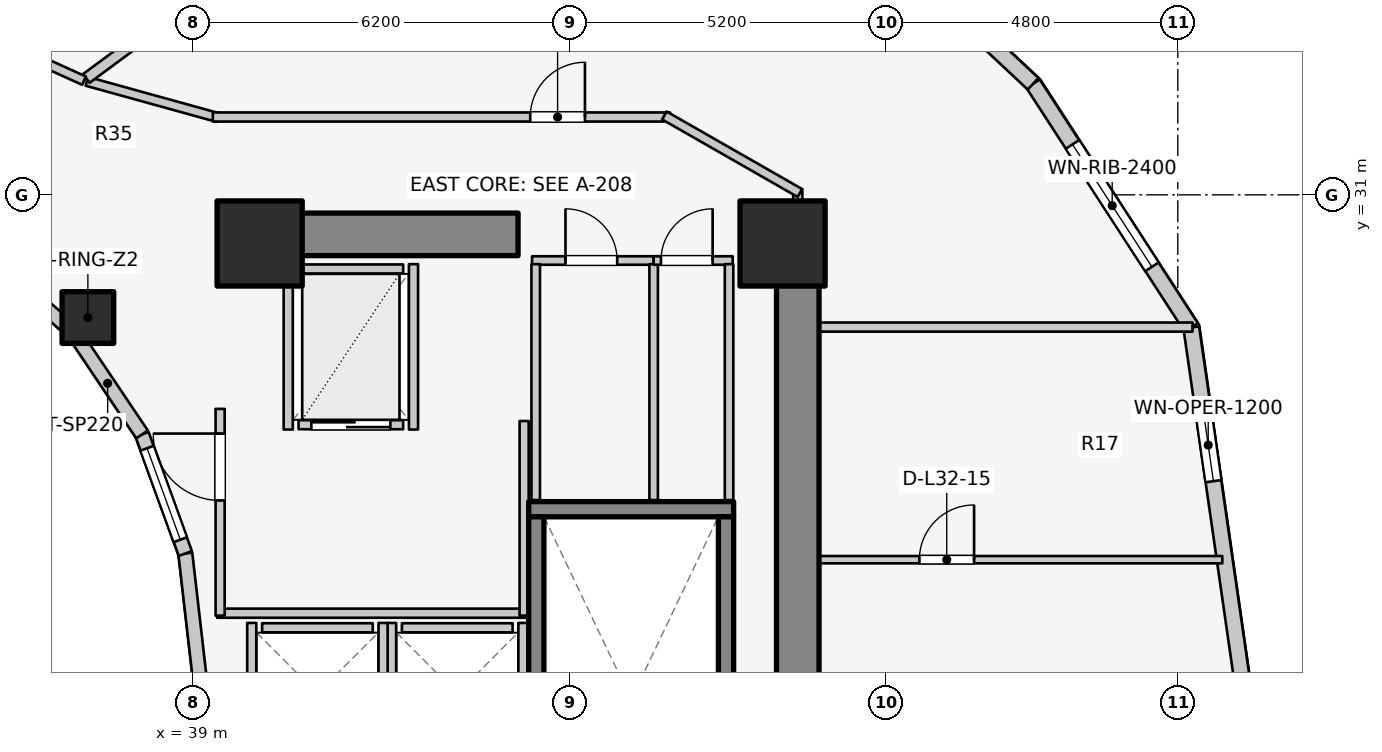
"""IFC4 building model, lengths in metres.
Left out: names, types, materials, properties, quantities, classifications, styles, units other than length and angle.
Written with IfcOpenShell. Run it as: python <this file> out.ifc"""

import sys

from ifc_helpers import new_model, si_unit, direction, frame, frame_2d, origin, origin_2d, place, context, subcontext, project, spatial, rectangle, extrude, element, fill, save


model = new_model("IFC4")
c1 = context("Model", 3, precision=1e-05, world=origin(), true_north=direction((0.0, 1.0)))
c2 = subcontext(c1, "Body", "Model", "MODEL_VIEW")
j1 = project(units=[si_unit("LENGTHUNIT", "METRE"), si_unit("PLANEANGLEUNIT", "RADIAN")], contexts=[c1])
p1 = place(None, origin())
s1 = spatial("IfcSite", under=j1, at=p1, CompositionType="ELEMENT")
p2 = place(p1, origin())
s2 = spatial("IfcBuilding", under=s1, at=p2, CompositionType="ELEMENT")
p3 = place(p2, frame((0.0, 0.0, 107.3)))
s3 = spatial("IfcBuildingStorey", under=s2, at=p3, CompositionType="ELEMENT", Elevation=107.3)
p4 = place(p3, frame((48.95, 17.05, 0.0), z_axis=(0.0, 0.0, 1.0), x_axis=(0.0, 1.0, 0.0)))
e1 = element("IfcWall", 1, at=p4, inside=s3, PredefinedType="SHEAR", context=c2, shape_type="SweptSolid", body=[
    extrude(rectangle(XDim=12.8, YDim=0.7, at=frame_2d((6.4, 0.0))), origin(), (0.0, 0.0, 1.0), 3.1),
])
p5 = place(p3, frame((39.85, 30.35, 0.0), z_axis=(0.0, 0.0, 1.0), x_axis=(1.0, 0.0, 0.0)))
e2 = element("IfcWall", 2, at=p5, inside=s3, PredefinedType="SHEAR", context=c2, shape_type="SweptSolid", body=[
    extrude(rectangle(XDim=4.5, YDim=0.7, at=frame_2d((2.25, 0.0))), origin(), (0.0, 0.0, 1.0), 3.1),
])
p6 = place(p3, frame((44.525, 25.83, 0.0), z_axis=(0.0, 0.0, 1.0), x_axis=(1.0, 0.0, 0.0)))
e3 = element("IfcWall", 3, at=p6, inside=s3, PredefinedType="SOLIDWALL", context=c2, shape_type="SweptSolid", body=[
    extrude(rectangle(XDim=3.37, YDim=0.25, at=frame_2d((1.685, 0.0))), origin(), (0.0, 0.0, 1.0), 3.1),
])
for number, where, z_axis, x_axis in (
    (4, (44.65, 17.895, 0.0), (0.0, 0.0, 1.0), (0.0, 1.0, 0.0)),
    (5, (47.77, 17.895, 0.0), (0.0, 0.0, 1.0), (0.0, 1.0, 0.0)),
):
    element("IfcWall", number, at=place(p3, frame(where, z_axis=z_axis, x_axis=x_axis)), inside=s3, PredefinedType="SOLIDWALL", context=c2, shape_type="SweptSolid", body=[
        extrude(rectangle(XDim=7.81, YDim=0.25, at=frame_2d((3.905, 0.0))), origin(), (0.0, 0.0, 1.0), 3.1),
    ])
for number, where, z_axis, x_axis in (
    (6, (48.7, 30.2, 0.0), (0.0, 0.0, 1.0), (1.0, 0.0, 0.0)),
    (7, (40.1, 30.2, 0.0), (0.0, 0.0, 1.0), (1.0, 0.0, 0.0)),
):
    element("IfcColumn", number, at=place(p3, frame(where, z_axis=z_axis, x_axis=x_axis)), inside=s3, PredefinedType="COLUMN", context=c2, shape_type="SweptSolid", body=[
        extrude(rectangle(XDim=1.4, YDim=1.4, at=origin_2d()), origin(), (0.0, 0.0, 1.0), 3.1),
    ])
p7 = place(p3, frame((37.275, 28.982, 0.0), z_axis=(0.0, 0.0, 1.0), x_axis=(1.0, 0.0, 0.0)))
e8 = element("IfcColumn", 8, at=p7, inside=s3, PredefinedType="COLUMN", context=c2, shape_type="SweptSolid", body=[
    extrude(rectangle(XDim=0.85, YDim=0.85, at=origin_2d()), origin(), (0.0, 0.0, 1.0), 3.1),
])
p8 = place(p3, frame((39.12, 23.0, 0.0), z_axis=(0.0, 0.0, 1.0), x_axis=(-0.114711713601, 0.993398823617, 0.0)))
e9 = element("IfcWall", 9, at=p8, inside=s3, PredefinedType="STANDARD", context=c2, shape_type="SweptSolid", body=[
    extrude(rectangle(XDim=2.115, YDim=0.23, at=frame_2d((1.058, 0.0))), origin(), (0.0, 0.0, 1.0), 2.84),
])
p9 = place(p3, frame((38.877, 25.102, 0.0), z_axis=(0.0, 0.0, 1.0), x_axis=(-0.341423187295, 0.93990968033, 0.0)))
e10 = element("IfcWall", 10, at=p9, inside=s3, PredefinedType="STANDARD", context=c2, shape_type="SweptSolid", body=[
    extrude(rectangle(XDim=2.084, YDim=0.23, at=frame_2d((1.042, 0.0))), origin(), (0.0, 0.0, 1.0), 2.84),
])
p10 = place(p9, frame((0.242, 0.0, 0.85)))
e11 = element("IfcOpeningElement", 11, at=p10, cuts=e10, PredefinedType="OPENING", context=c2, shape_type="SweptSolid", body=[
    extrude(rectangle(XDim=1.6, YDim=1.65, at=frame_2d((0.8, 0.825))), frame((0.0, 0.125, 0.0), z_axis=(0.0, -1.0, 0.0), x_axis=(1.0, 0.0, 0.0)), (0.0, 0.0, 1.0), 0.25),
])
p11 = place(p3, frame((38.166, 27.06, 0.0), z_axis=(0.0, 0.0, 1.0), x_axis=(-0.558197800898, 0.829707909492, 0.0)))
e12 = element("IfcWall", 12, at=p11, inside=s3, PredefinedType="STANDARD", context=c2, shape_type="SweptSolid", body=[
    extrude(rectangle(XDim=2.027, YDim=0.23, at=frame_2d((1.013, 0.0))), origin(), (0.0, 0.0, 1.0), 2.16),
])
p12 = place(p3, frame((37.035, 28.742, 0.0), z_axis=(0.0, 0.0, 1.0), x_axis=(-0.752576694707, 0.658504607869, 0.0)))
e13 = element("IfcWall", 13, at=p12, inside=s3, PredefinedType="STANDARD", context=c2, shape_type="SweptSolid", body=[
    extrude(rectangle(XDim=1.959, YDim=0.23, at=frame_2d((0.98, 0.0))), origin(), (0.0, 0.0, 1.0), 2.16),
])
p13 = place(p3, frame((56.26, 23.0, 0.0), z_axis=(0.0, 0.0, 1.0), x_axis=(-0.142572472068, 0.98978436551, 0.0)))
e14 = element("IfcWall", 14, at=p13, inside=s3, PredefinedType="STANDARD", context=c2, shape_type="SweptSolid", body=[
    extrude(rectangle(XDim=5.879, YDim=0.26, at=frame_2d((2.939, 0.0))), origin(), (0.0, 0.0, 1.0), 2.85),
])
p14 = place(p13, frame((3.325, 0.0, 0.75)))
e15 = element("IfcOpeningElement", 15, at=p14, cuts=e14, PredefinedType="OPENING", context=c2, shape_type="SweptSolid", body=[
    extrude(rectangle(XDim=1.2, YDim=1.5, at=frame_2d((0.6, 0.75))), frame((0.0, 0.14, 0.0), z_axis=(0.0, -1.0, 0.0), x_axis=(1.0, 0.0, 0.0)), (0.0, 0.0, 1.0), 0.28),
])
p15 = place(p3, frame((55.422, 28.819, 0.0), z_axis=(0.0, 0.0, 1.0), x_axis=(-0.544388392991, 0.838833283541, 0.0)))
e16 = element("IfcWall", 16, at=p15, inside=s3, PredefinedType="STANDARD", context=c2, shape_type="SweptSolid", body=[
    extrude(rectangle(XDim=4.778, YDim=0.26, at=frame_2d((2.389, 0.0))), origin(), (0.0, 0.0, 1.0), 2.85),
])
p16 = place(p15, frame((1.189, 0.0, 0.75)))
e17 = element("IfcOpeningElement", 17, at=p16, cuts=e16, PredefinedType="OPENING", context=c2, shape_type="SweptSolid", body=[
    extrude(rectangle(XDim=2.4, YDim=1.7, at=frame_2d((1.2, 0.85))), frame((0.0, 0.14, 0.0), z_axis=(0.0, -1.0, 0.0), x_axis=(1.0, 0.0, 0.0)), (0.0, 0.0, 1.0), 0.28),
])
p17 = place(p3, frame((52.821, 32.827, 0.0), z_axis=(0.0, 0.0, 1.0), x_axis=(-0.730162452258, 0.68327358599, 0.0)))
e18 = element("IfcWall", 18, at=p17, inside=s3, PredefinedType="STANDARD", context=c2, shape_type="SweptSolid", body=[
    extrude(rectangle(XDim=4.868, YDim=0.26, at=frame_2d((2.434, 0.0))), origin(), (0.0, 0.0, 1.0), 2.85),
])
p18 = place(p17, frame((1.684, 0.0, 0.75)))
e19 = element("IfcOpeningElement", 19, at=p18, cuts=e18, PredefinedType="OPENING", context=c2, shape_type="SweptSolid", body=[
    extrude(rectangle(XDim=1.5, YDim=1.6, at=frame_2d((0.75, 0.8))), frame((0.0, 0.14, 0.0), z_axis=(0.0, -1.0, 0.0), x_axis=(1.0, 0.0, 0.0)), (0.0, 0.0, 1.0), 0.28),
])
p19 = place(p3, frame((42.44, 23.88, 0.0), z_axis=(0.0, 0.0, 1.0), x_axis=(1.0, 0.0, 0.0)))
e20 = element("IfcWall", 20, at=p19, inside=s3, PredefinedType="SOLIDWALL", context=c2, shape_type="SweptSolid", body=[
    extrude(rectangle(XDim=1.82, YDim=0.15, at=frame_2d((0.91, 0.0))), origin(), (0.0, 0.0, 1.0), 2.855),
])
for number, where, z_axis, x_axis in (
    (21, (42.27, 21.64, 0.0), (0.0, 0.0, 1.0), (0.0, 1.0, 0.0)),
    (22, (44.43, 21.64, 0.0), (0.0, 0.0, 1.0), (0.0, 1.0, 0.0)),
):
    element("IfcWall", number, at=place(p3, frame(where, z_axis=z_axis, x_axis=x_axis)), inside=s3, PredefinedType="SOLIDWALL", context=c2, shape_type="SweptSolid", body=[
        extrude(rectangle(XDim=2.32, YDim=0.15, at=frame_2d((1.16, 0.0))), origin(), (0.0, 0.0, 1.0), 2.855),
    ])
p20 = place(p3, frame((40.14, 23.88, 0.0), z_axis=(0.0, 0.0, 1.0), x_axis=(1.0, 0.0, 0.0)))
e23 = element("IfcWall", 23, at=p20, inside=s3, PredefinedType="SOLIDWALL", context=c2, shape_type="SweptSolid", body=[
    extrude(rectangle(XDim=1.82, YDim=0.15, at=frame_2d((0.91, 0.0))), origin(), (0.0, 0.0, 1.0), 2.12),
])
p21 = place(p3, frame((39.97, 21.64, 0.0), z_axis=(0.0, 0.0, 1.0), x_axis=(0.0, 1.0, 0.0)))
e24 = element("IfcWall", 24, at=p21, inside=s3, PredefinedType="SOLIDWALL", context=c2, shape_type="SweptSolid", body=[
    extrude(rectangle(XDim=2.32, YDim=0.15, at=frame_2d((1.16, 0.0))), origin(), (0.0, 0.0, 1.0), 2.12),
])
p22 = place(p3, frame((42.13, 21.64, 0.0), z_axis=(0.0, 0.0, 1.0), x_axis=(0.0, 1.0, 0.0)))
e25 = element("IfcWall", 25, at=p22, inside=s3, PredefinedType="SOLIDWALL", context=c2, shape_type="SweptSolid", body=[
    extrude(rectangle(XDim=2.32, YDim=0.15, at=frame_2d((1.16, 0.0))), origin(), (0.0, 0.0, 1.0), 2.855),
])
p23 = place(p3, frame((40.74, 27.22, 0.0), z_axis=(0.0, 0.0, 1.0), x_axis=(1.0, 0.0, 0.0)))
e26 = element("IfcWall", 26, at=p23, inside=s3, PredefinedType="SOLIDWALL", context=c2, shape_type="SweptSolid", body=[
    extrude(rectangle(XDim=1.72, YDim=0.15, at=frame_2d((0.86, 0.0))), origin(), (0.0, 0.0, 1.0), 2.855),
])
p24 = place(p23, frame((0.21, 0.0, 0.0)))
e27 = element("IfcOpeningElement", 27, at=p24, cuts=e26, PredefinedType="OPENING", context=c2, shape_type="SweptSolid", body=[
    extrude(rectangle(XDim=1.3, YDim=2.1, at=frame_2d((0.65, 1.05))), frame((0.0, 0.085, 0.0), z_axis=(0.0, -1.0, 0.0), x_axis=(1.0, 0.0, 0.0)), (0.0, 0.0, 1.0), 0.17),
])
p25 = place(p3, frame((40.74, 29.78, 0.0), z_axis=(0.0, 0.0, 1.0), x_axis=(1.0, 0.0, 0.0)))
e28 = element("IfcWall", 28, at=p25, inside=s3, PredefinedType="SOLIDWALL", context=c2, shape_type="SweptSolid", body=[
    extrude(rectangle(XDim=1.72, YDim=0.15, at=frame_2d((0.86, 0.0))), origin(), (0.0, 0.0, 1.0), 2.855),
])
for number, where, z_axis, x_axis in (
    (29, (40.57, 27.14, 0.0), (0.0, 0.0, 1.0), (0.0, 1.0, 0.0)),
    (30, (42.63, 27.14, 0.0), (0.0, 0.0, 1.0), (0.0, 1.0, 0.0)),
):
    element("IfcWall", number, at=place(p3, frame(where, z_axis=z_axis, x_axis=x_axis)), inside=s3, PredefinedType="SOLIDWALL", context=c2, shape_type="SweptSolid", body=[
        extrude(rectangle(XDim=2.72, YDim=0.15, at=frame_2d((1.36, 0.0))), origin(), (0.0, 0.0, 1.0), 2.855),
    ])
p26 = place(p3, frame((39.4, 24.12, 0.0), z_axis=(0.0, 0.0, 1.0), x_axis=(1.0, 0.0, 0.0)))
e31 = element("IfcWall", 31, at=p26, inside=s3, PredefinedType="PARTITIONING", context=c2, shape_type="SweptSolid", body=[
    extrude(rectangle(XDim=5.08, YDim=0.15, at=frame_2d((2.54, 0.0))), origin(), (0.0, 0.0, 1.0), 2.12),
])
p27 = place(p3, frame((44.45, 24.08, 0.0), z_axis=(0.0, 0.0, 1.0), x_axis=(0.0, 1.0, 0.0)))
e32 = element("IfcWall", 32, at=p27, inside=s3, PredefinedType="PARTITIONING", context=c2, shape_type="SweptSolid", body=[
    extrude(rectangle(XDim=3.2, YDim=0.15, at=frame_2d((1.6, 0.0))), origin(), (0.0, 0.0, 1.0), 2.855),
])
p28 = place(p3, frame((39.45, 24.08, 0.0), z_axis=(0.0, 0.0, 1.0), x_axis=(0.0, 1.0, 0.0)))
e33 = element("IfcWall", 33, at=p28, inside=s3, PredefinedType="PARTITIONING", context=c2, shape_type="SweptSolid", body=[
    extrude(rectangle(XDim=3.4, YDim=0.15, at=frame_2d((1.7, 0.0))), origin(), (0.0, 0.0, 1.0), 2.855),
])
p29 = place(p28, frame((1.894, 0.0, 0.0)))
e34 = element("IfcOpeningElement", 34, at=p29, cuts=e33, PredefinedType="OPENING", context=c2, shape_type="SweptSolid", body=[
    extrude(rectangle(XDim=1.1, YDim=2.1, at=frame_2d((0.55, 1.05))), frame((0.0, 0.085, 0.0), z_axis=(0.0, -1.0, 0.0), x_axis=(1.0, 0.0, 0.0)), (0.0, 0.0, 1.0), 0.17),
])
p30 = place(p3, frame((44.58, 29.92, 0.0), z_axis=(0.0, 0.0, 1.0), x_axis=(1.0, 0.0, 0.0)))
e35 = element("IfcWall", 35, at=p30, inside=s3, PredefinedType="PLUMBINGWALL", context=c2, shape_type="SweptSolid", body=[
    extrude(rectangle(XDim=2.0, YDim=0.14, at=frame_2d((1.0, 0.0))), origin(), (0.0, 0.0, 1.0), 2.855),
])
p31 = place(p30, frame((0.55, 0.0, 0.0)))
e36 = element("IfcOpeningElement", 36, at=p31, cuts=e35, PredefinedType="OPENING", context=c2, shape_type="SweptSolid", body=[
    extrude(rectangle(XDim=0.85, YDim=2.05, at=frame_2d((0.425, 1.025))), frame((0.0, 0.08, 0.0), z_axis=(0.0, -1.0, 0.0), x_axis=(1.0, 0.0, 0.0)), (0.0, 0.0, 1.0), 0.16),
])
for number, where, z_axis, x_axis in (
    (37, (44.64, 25.98, 0.0), (0.0, 0.0, 1.0), (0.0, 1.0, 0.0)),
    (38, (46.58, 25.98, 0.0), (0.0, 0.0, 1.0), (0.0, 1.0, 0.0)),
):
    element("IfcWall", number, at=place(p3, frame(where, z_axis=z_axis, x_axis=x_axis)), inside=s3, PredefinedType="PLUMBINGWALL", context=c2, shape_type="SweptSolid", body=[
        extrude(rectangle(XDim=3.88, YDim=0.14, at=frame_2d((1.94, 0.0))), origin(), (0.0, 0.0, 1.0), 2.855),
    ])
p32 = place(p3, frame((46.58, 29.92, 0.0), z_axis=(0.0, 0.0, 1.0), x_axis=(1.0, 0.0, 0.0)))
e39 = element("IfcWall", 39, at=p32, inside=s3, PredefinedType="PLUMBINGWALL", context=c2, shape_type="SweptSolid", body=[
    extrude(rectangle(XDim=1.3, YDim=0.14, at=frame_2d((0.65, 0.0))), origin(), (0.0, 0.0, 1.0), 2.855),
])
p33 = place(p32, frame((0.12, 0.0, 0.0)))
e40 = element("IfcOpeningElement", 40, at=p33, cuts=e39, PredefinedType="OPENING", context=c2, shape_type="SweptSolid", body=[
    extrude(rectangle(XDim=0.85, YDim=2.05, at=frame_2d((0.425, 1.025))), frame((0.0, 0.08, 0.0), z_axis=(0.0, -1.0, 0.0), x_axis=(1.0, 0.0, 0.0)), (0.0, 0.0, 1.0), 0.16),
])
p34 = place(p3, frame((47.82, 25.98, 0.0), z_axis=(0.0, 0.0, 1.0), x_axis=(0.0, 1.0, 0.0)))
e41 = element("IfcWall", 41, at=p34, inside=s3, PredefinedType="PLUMBINGWALL", context=c2, shape_type="SweptSolid", body=[
    extrude(rectangle(XDim=3.88, YDim=0.14, at=frame_2d((1.94, 0.0))), origin(), (0.0, 0.0, 1.0), 2.855),
])
p35 = place(p3, frame((48.95, 28.825, 0.0), z_axis=(0.0, 0.0, 1.0), x_axis=(1.0, 0.0, 0.0)))
e42 = element("IfcWall", 42, at=p35, inside=s3, PredefinedType="PARTITIONING", context=c2, shape_type="SweptSolid", body=[
    extrude(rectangle(XDim=6.492, YDim=0.15, at=frame_2d((3.246, 0.0))), origin(), (0.0, 0.0, 1.0), 2.855),
])
p36 = place(p3, frame((48.95, 25.0, 0.0), z_axis=(0.0, 0.0, 1.0), x_axis=(1.0, 0.0, 0.0)))
e43 = element("IfcWall", 43, at=p36, inside=s3, PredefinedType="MOVABLE", context=c2, shape_type="SweptSolid", body=[
    extrude(rectangle(XDim=6.982, YDim=0.12, at=frame_2d((3.491, 0.0))), origin(), (0.0, 0.0, 1.0), 2.855),
])
p37 = place(p36, frame((2.0, 0.0, 0.0)))
e44 = element("IfcOpeningElement", 44, at=p37, cuts=e43, PredefinedType="OPENING", context=c2, shape_type="SweptSolid", body=[
    extrude(rectangle(XDim=0.9, YDim=2.1, at=frame_2d((0.45, 1.05))), frame((0.0, 0.07, 0.0), z_axis=(0.0, -1.0, 0.0), x_axis=(1.0, 0.0, 0.0)), (0.0, 0.0, 1.0), 0.14),
])
p38 = place(p3, frame((48.95, 29.8, 0.0), z_axis=(0.0, 0.0, 1.0), x_axis=(0.0, 1.0, 0.0)))
e45 = element("IfcWall", 45, at=p38, inside=s3, PredefinedType="PARTITIONING", context=c2, shape_type="SweptSolid", body=[
    extrude(rectangle(XDim=1.29, YDim=0.15, at=frame_2d((0.645, 0.0))), origin(), (0.0, 0.0, 1.0), 2.142),
])
p39 = place(p3, frame((37.258, 32.867, 0.0), z_axis=(0.0, 0.0, 1.0), x_axis=(0.963833843713, -0.266503886865, 0.0)))
e46 = element("IfcWall", 46, at=p39, inside=s3, PredefinedType="PARTITIONING", context=c2, shape_type="SweptSolid", body=[
    extrude(rectangle(XDim=2.232, YDim=0.15, at=frame_2d((1.116, 0.0))), origin(), (0.0, 0.0, 1.0), 2.272),
])
p40 = place(p3, frame((39.33, 32.28, 0.0), z_axis=(0.0, 0.0, 1.0), x_axis=(1.0, 0.0, 0.0)))
e47 = element("IfcWall", 47, at=p40, inside=s3, PredefinedType="PARTITIONING", context=c2, shape_type="SweptSolid", body=[
    extrude(rectangle(XDim=7.52, YDim=0.15, at=frame_2d((3.76, 0.0))), origin(), (0.0, 0.0, 1.0), 2.272),
])
p41 = place(p40, frame((5.22, 0.0, 0.0)))
e48 = element("IfcOpeningElement", 48, at=p41, cuts=e47, PredefinedType="OPENING", context=c2, shape_type="SweptSolid", body=[
    extrude(rectangle(XDim=0.9, YDim=2.1, at=frame_2d((0.45, 1.05))), frame((0.0, 0.085, 0.0), z_axis=(0.0, -1.0, 0.0), x_axis=(1.0, 0.0, 0.0)), (0.0, 0.0, 1.0), 0.17),
])
p42 = place(p3, frame((46.757, 32.305, 0.0), z_axis=(0.0, 0.0, 1.0), x_axis=(0.867991349648, -0.496579315857, 0.0)))
e49 = element("IfcWall", 49, at=p42, inside=s3, PredefinedType="PARTITIONING", context=c2, shape_type="SweptSolid", body=[
    extrude(rectangle(XDim=2.567, YDim=0.15, at=frame_2d((1.283, 0.0))), origin(), (0.0, 0.0, 1.0), 2.142),
])
p43 = place(p3, frame((37.249, 32.914, 0.0), z_axis=(0.0, 0.0, 1.0), x_axis=(0.80430981394, 0.594210167533, 0.0)))
e50 = element("IfcWall", 50, at=p43, inside=s3, PredefinedType="PARTITIONING", context=c2, shape_type="SweptSolid", body=[
    extrude(rectangle(XDim=9.146, YDim=0.18, at=frame_2d((4.573, 0.0))), origin(), (0.0, 0.0, 1.0), 2.272),
])
p44 = place(p3, frame((37.211, 32.877, 0.0), z_axis=(0.0, 0.0, 1.0), x_axis=(-0.910568469686, 0.41335827319, 0.0)))
e51 = element("IfcWall", 51, at=p44, inside=s3, PredefinedType="PARTITIONING", context=c2, shape_type="SweptSolid", body=[
    extrude(rectangle(XDim=2.772, YDim=0.15, at=frame_2d((1.386, 0.0))), origin(), (0.0, 0.0, 1.0), 2.272),
])
p45 = place(p44, frame((0.911, 0.0, 0.0)))
e52 = element("IfcOpeningElement", 52, at=p45, cuts=e51, PredefinedType="OPENING", context=c2, shape_type="SweptSolid", body=[
    extrude(rectangle(XDim=0.95, YDim=2.1, at=frame_2d((0.475, 1.05))), frame((0.0, 0.085, 0.0), z_axis=(0.0, -1.0, 0.0), x_axis=(1.0, 0.0, 0.0)), (0.0, 0.0, 1.0), 0.17),
])
p46 = place(p10, origin())
e53 = element("IfcWindow", 53, at=p46, inside=s3, PartitioningType="SINGLE_PANEL", PredefinedType="WINDOW", context=c2, shape_type="SweptSolid", body=[
    extrude(rectangle(XDim=1.6, YDim=1.65, at=frame_2d((0.8, 0.825))), frame((0.0, 0.03, 0.0), z_axis=(0.0, -1.0, 0.0), x_axis=(1.0, 0.0, 0.0)), (0.0, 0.0, 1.0), 0.06),
])
fill(e11, e53)
p47 = place(p14, origin())
e54 = element("IfcWindow", 54, at=p47, inside=s3, PartitioningType="SINGLE_PANEL", PredefinedType="WINDOW", context=c2, shape_type="SweptSolid", body=[
    extrude(rectangle(XDim=1.2, YDim=1.5, at=frame_2d((0.6, 0.75))), frame((0.0, 0.03, 0.0), z_axis=(0.0, -1.0, 0.0), x_axis=(1.0, 0.0, 0.0)), (0.0, 0.0, 1.0), 0.06),
])
fill(e15, e54)
p48 = place(p16, origin())
e55 = element("IfcWindow", 55, at=p48, inside=s3, PartitioningType="SINGLE_PANEL", PredefinedType="WINDOW", context=c2, shape_type="SweptSolid", body=[
    extrude(rectangle(XDim=2.4, YDim=1.7, at=frame_2d((1.2, 0.85))), frame((0.0, 0.03, 0.0), z_axis=(0.0, -1.0, 0.0), x_axis=(1.0, 0.0, 0.0)), (0.0, 0.0, 1.0), 0.06),
])
fill(e17, e55)
p49 = place(p24, origin())
e56 = element("IfcDoor", 56, at=p49, inside=s3, OperationType="DOUBLE_DOOR_SLIDING", PredefinedType="DOOR", context=c2, shape_type="SweptSolid", body=[
    extrude(rectangle(XDim=1.3, YDim=2.1, at=frame_2d((0.65, 1.05))), frame((0.0, 0.025, 0.0), z_axis=(0.0, -1.0, 0.0), x_axis=(1.0, 0.0, 0.0)), (0.0, 0.0, 1.0), 0.05),
])
fill(e27, e56)
p50 = place(p29, origin())
e57 = element("IfcDoor", 57, at=p50, inside=s3, OperationType="SINGLE_SWING_RIGHT", PredefinedType="DOOR", context=c2, shape_type="SweptSolid", body=[
    extrude(rectangle(XDim=1.1, YDim=2.1, at=frame_2d((0.55, 1.05))), frame((0.0, 0.025, 0.0), z_axis=(0.0, -1.0, 0.0), x_axis=(1.0, 0.0, 0.0)), (0.0, 0.0, 1.0), 0.05),
])
fill(e34, e57)
p51 = place(p31, origin())
e58 = element("IfcDoor", 58, at=p51, inside=s3, OperationType="SINGLE_SWING_LEFT", PredefinedType="DOOR", context=c2, shape_type="SweptSolid", body=[
    extrude(rectangle(XDim=0.85, YDim=2.05, at=frame_2d((0.425, 1.025))), frame((0.0, 0.025, 0.0), z_axis=(0.0, -1.0, 0.0), x_axis=(1.0, 0.0, 0.0)), (0.0, 0.0, 1.0), 0.05),
])
fill(e36, e58)
p52 = place(p33, origin())
e59 = element("IfcDoor", 59, at=p52, inside=s3, OperationType="SINGLE_SWING_RIGHT", PredefinedType="DOOR", context=c2, shape_type="SweptSolid", body=[
    extrude(rectangle(XDim=0.85, YDim=2.05, at=frame_2d((0.425, 1.025))), frame((0.0, 0.025, 0.0), z_axis=(0.0, -1.0, 0.0), x_axis=(1.0, 0.0, 0.0)), (0.0, 0.0, 1.0), 0.05),
])
fill(e40, e59)
p53 = place(p37, origin())
e60 = element("IfcDoor", 60, at=p53, inside=s3, OperationType="SINGLE_SWING_RIGHT", PredefinedType="DOOR", context=c2, shape_type="SweptSolid", body=[
    extrude(rectangle(XDim=0.9, YDim=2.1, at=frame_2d((0.45, 1.05))), frame((0.0, 0.025, 0.0), z_axis=(0.0, -1.0, 0.0), x_axis=(1.0, 0.0, 0.0)), (0.0, 0.0, 1.0), 0.05),
])
fill(e44, e60)
p54 = place(p41, origin())
e61 = element("IfcDoor", 61, at=p54, inside=s3, OperationType="SINGLE_SWING_RIGHT", PredefinedType="DOOR", context=c2, shape_type="SweptSolid", body=[
    extrude(rectangle(XDim=0.9, YDim=2.1, at=frame_2d((0.45, 1.05))), frame((0.0, 0.025, 0.0), z_axis=(0.0, -1.0, 0.0), x_axis=(1.0, 0.0, 0.0)), (0.0, 0.0, 1.0), 0.05),
])
fill(e48, e61)
save(model, sys.argv[1])
